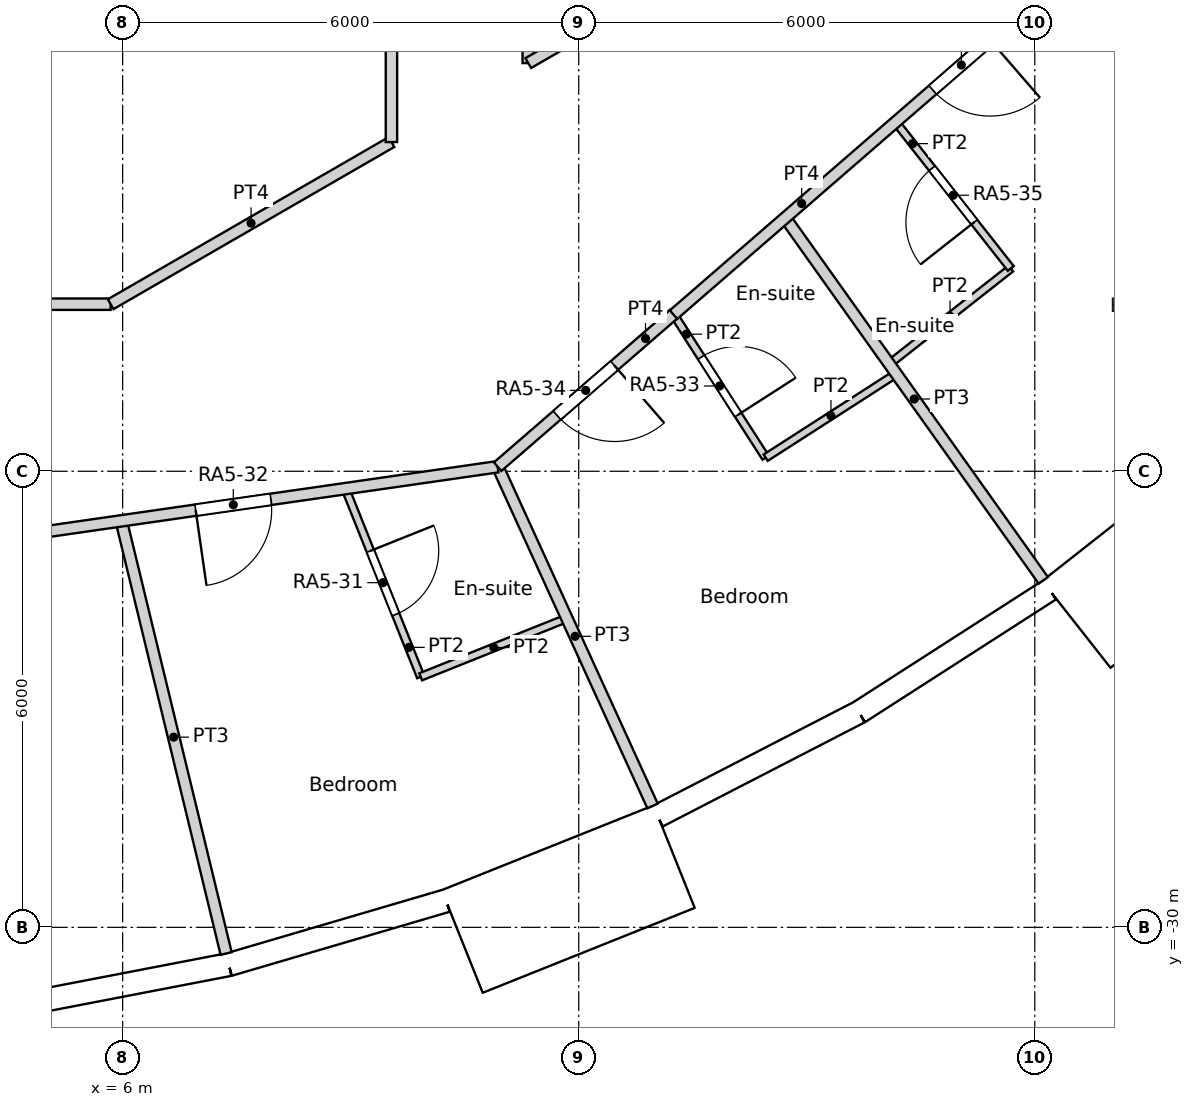
"""IFC4 building model, lengths in metres.
Left out: names, types, materials, properties, quantities, classifications, styles, units other than length and angle.
Written with IfcOpenShell. Run it as: python <this file> out.ifc"""

import sys

from ifc_helpers import new_model, si_unit, direction, frame, frame_2d, origin, origin_2d, place, context, subcontext, project, spatial, rectangle, circle, extrude, element, fill, save


model = new_model("IFC4")
c1 = context("Model", 3, precision=1e-05, world=origin(), true_north=direction((0.0, 1.0)))
c2 = subcontext(c1, "Body", "Model", "MODEL_VIEW")
j1 = project(units=[si_unit("LENGTHUNIT", "METRE"), si_unit("PLANEANGLEUNIT", "RADIAN")], contexts=[c1])
p1 = place(None, origin())
s1 = spatial("IfcSite", under=j1, at=p1, CompositionType="ELEMENT")
p2 = place(p1, origin())
s2 = spatial("IfcBuilding", under=s1, at=p2, CompositionType="ELEMENT")
p3 = place(p2, frame((0.0, 0.0, 71.4)))
s3 = spatial("IfcBuildingStorey", under=s2, at=p3, CompositionType="ELEMENT", Elevation=71.4)
for number, where, z_axis, x_axis in (
    (1, (7.137, -29.421, 0.0), (0.0, 0.0, 1.0), (1.0, 0.0, 0.0)),
    (2, (12.576, -27.539, 0.0), (0.0, 0.0, 1.0), (1.0, 0.0, 0.0)),
    (3, (17.561, -24.661, 0.0), (0.0, 0.0, 1.0), (1.0, 0.0, 0.0)),
):
    element("IfcColumn", number, at=place(p3, frame(where, z_axis=z_axis, x_axis=x_axis)), inside=s3, PredefinedType="COLUMN", context=c2, shape_type="SweptSolid", body=[
        extrude(circle(Radius=0.6, at=origin_2d()), origin(), (0.0, 0.0, 1.0), 3.6),
    ])
for number, where, z_axis, x_axis in (
    (4, (9.723, -22.54, 0.0), (0.0, 0.0, 1.0), (1.0, 0.0, 0.0)),
    (5, (14.659, -19.69, 0.0), (0.0, 0.0, 1.0), (1.0, 0.0, 0.0)),
):
    element("IfcColumn", number, at=place(p3, frame(where, z_axis=z_axis, x_axis=x_axis)), inside=s3, PredefinedType="COLUMN", context=c2, shape_type="SweptSolid", body=[
        extrude(circle(Radius=0.65, at=origin_2d()), origin(), (0.0, 0.0, 1.0), 3.6),
    ])
p4 = place(p3, frame((4.471, -31.054, 0.0), z_axis=(0.0, 0.0, 1.0), x_axis=(0.981924535406, 0.189272836848, 0.0)))
e6 = element("IfcWall", 6, at=p4, inside=s3, PredefinedType="SOLIDWALL", context=c2, shape_type="SweptSolid", body=[
    extrude(rectangle(XDim=2.98, YDim=0.3, at=frame_2d((1.49, 0.0))), origin(), (0.0, 0.0, 1.0), 3.15),
])
p5 = place(p4, frame((1.49, 0.0, 1.55)))
e7 = element("IfcOpeningElement", 7, at=p5, cuts=e6, PredefinedType="OPENING", context=c2, shape_type="SweptSolid", body=[
    extrude(circle(Radius=0.9, at=origin_2d()), frame((0.0, 0.16, 0.0), z_axis=(0.0, -1.0, 0.0), x_axis=(1.0, 0.0, 0.0)), (0.0, 0.0, 1.0), 0.32),
])
p6 = place(p3, frame((7.397, -30.49, 0.0), z_axis=(0.0, 0.0, 1.0), x_axis=(0.959507586834, 0.28168278401, 0.0)))
e8 = element("IfcWall", 8, at=p6, inside=s3, PredefinedType="SOLIDWALL", context=c2, shape_type="SweptSolid", body=[
    extrude(rectangle(XDim=2.98, YDim=0.3, at=frame_2d((1.49, 0.0))), origin(), (0.0, 0.0, 1.0), 3.15),
])
p7 = place(p6, frame((1.49, 0.0, 1.55)))
e9 = element("IfcOpeningElement", 9, at=p7, cuts=e8, PredefinedType="OPENING", context=c2, shape_type="SweptSolid", body=[
    extrude(circle(Radius=0.9, at=origin_2d()), frame((0.0, 0.16, 0.0), z_axis=(0.0, -1.0, 0.0), x_axis=(1.0, 0.0, 0.0)), (0.0, 0.0, 1.0), 0.32),
])
p8 = place(p3, frame((10.469, -30.185, -0.45), z_axis=(0.0, 0.0, 1.0), x_axis=(0.928358776184, 0.371685327504, 0.0)))
e10 = element("IfcWall", 10, at=p8, inside=s3, PredefinedType="ELEMENTEDWALL", context=c2, shape_type="SweptSolid", body=[
    extrude(rectangle(XDim=3.0, YDim=1.45, at=frame_2d((1.5, 0.0))), origin(), (0.0, 0.0, 1.0), 3.6),
])
p9 = place(p8, frame((1.5, 0.0, 2.0)))
e11 = element("IfcOpeningElement", 11, at=p9, cuts=e10, PredefinedType="OPENING", context=c2, shape_type="SweptSolid", body=[
    extrude(circle(Radius=0.9, at=origin_2d()), frame((0.0, 0.735, 0.0), z_axis=(0.0, -1.0, 0.0), x_axis=(1.0, 0.0, 0.0)), (0.0, 0.0, 1.0), 1.47),
])
p10 = place(p3, frame((13.039, -28.536, 0.0), z_axis=(0.0, 0.0, 1.0), x_axis=(0.888853225096, 0.4581920386, 0.0)))
e12 = element("IfcWall", 12, at=p10, inside=s3, PredefinedType="SOLIDWALL", context=c2, shape_type="SweptSolid", body=[
    extrude(rectangle(XDim=2.979, YDim=0.3, at=frame_2d((1.49, 0.0))), origin(), (0.0, 0.0, 1.0), 3.15),
])
p11 = place(p10, frame((1.49, 0.0, 1.55)))
e13 = element("IfcOpeningElement", 13, at=p11, cuts=e12, PredefinedType="OPENING", context=c2, shape_type="SweptSolid", body=[
    extrude(circle(Radius=0.9, at=origin_2d()), frame((0.0, 0.16, 0.0), z_axis=(0.0, -1.0, 0.0), x_axis=(1.0, 0.0, 0.0)), (0.0, 0.0, 1.0), 0.32),
])
p12 = place(p3, frame((15.687, -27.171, 0.0), z_axis=(0.0, 0.0, 1.0), x_axis=(0.84122372879, 0.540687190639, 0.0)))
e14 = element("IfcWall", 14, at=p12, inside=s3, PredefinedType="SOLIDWALL", context=c2, shape_type="SweptSolid", body=[
    extrude(rectangle(XDim=2.98, YDim=0.3, at=frame_2d((1.49, 0.0))), origin(), (0.0, 0.0, 1.0), 3.15),
])
p13 = place(p12, frame((1.49, 0.0, 1.55)))
e15 = element("IfcOpeningElement", 15, at=p13, cuts=e14, PredefinedType="OPENING", context=c2, shape_type="SweptSolid", body=[
    extrude(circle(Radius=0.9, at=origin_2d()), frame((0.0, 0.16, 0.0), z_axis=(0.0, -1.0, 0.0), x_axis=(1.0, 0.0, 0.0)), (0.0, 0.0, 1.0), 0.32),
])
p14 = place(p3, frame((18.549, -26.013, -0.45), z_axis=(0.0, 0.0, 1.0), x_axis=(0.786049992888, 0.618162930529, 0.0)))
e16 = element("IfcWall", 16, at=p14, inside=s3, PredefinedType="ELEMENTEDWALL", context=c2, shape_type="SweptSolid", body=[
    extrude(rectangle(XDim=3.0, YDim=1.45, at=frame_2d((1.5, 0.0))), origin(), (0.0, 0.0, 1.0), 3.6),
])
p15 = place(p14, frame((1.5, 0.0, 2.0)))
e17 = element("IfcOpeningElement", 17, at=p15, cuts=e16, PredefinedType="OPENING", context=c2, shape_type="SweptSolid", body=[
    extrude(circle(Radius=0.9, at=origin_2d()), frame((0.0, 0.735, 0.0), z_axis=(0.0, -1.0, 0.0), x_axis=(1.0, 0.0, 0.0)), (0.0, 0.0, 1.0), 1.47),
])
p16 = place(p3, frame((13.247, -21.939, 0.0), z_axis=(0.0, 0.0, 1.0), x_axis=(0.755420750547, 0.655240024451, 0.0)))
e18 = element("IfcWall", 18, at=p16, inside=s3, PredefinedType="PARTITIONING", context=c2, shape_type="SweptSolid", body=[
    extrude(rectangle(XDim=11.771, YDim=0.15, at=frame_2d((5.885, 0.0))), origin(), (0.0, 0.0, 1.0), 3.15),
])
p17 = place(p16, frame((4.513, 0.0, 0.0)))
e19 = element("IfcOpeningElement", 19, at=p17, cuts=e18, PredefinedType="OPENING", context=c2, shape_type="SweptSolid", body=[
    extrude(rectangle(XDim=1.0, YDim=2.1, at=frame_2d((0.5, 1.05))), frame((0.0, 0.075, 0.0), z_axis=(0.0, -1.0, 0.0), x_axis=(1.0, 0.0, 0.0)), (0.0, 0.0, 1.0), 0.15),
])
p18 = place(p16, frame((9.738, 0.0, 0.0)))
e20 = element("IfcOpeningElement", 20, at=p18, cuts=e18, PredefinedType="OPENING", context=c2, shape_type="SweptSolid", body=[
    extrude(rectangle(XDim=1.0, YDim=2.1, at=frame_2d((0.5, 1.05))), frame((0.0, 0.075, 0.0), z_axis=(0.0, -1.0, 0.0), x_axis=(1.0, 0.0, 0.0)), (0.0, 0.0, 1.0), 0.15),
])
p19 = place(p3, frame((0.608, -21.802, 0.0), z_axis=(0.0, 0.0, 1.0), x_axis=(1.0, 0.0, 0.0)))
e21 = element("IfcWall", 21, at=p19, inside=s3, PredefinedType="PARTITIONING", context=c2, shape_type="SweptSolid", body=[
    extrude(rectangle(XDim=5.234, YDim=0.15, at=frame_2d((2.617, 0.0))), origin(), (0.0, 0.0, 1.0), 3.15),
])
p20 = place(p3, frame((5.842, -21.802, 0.0), z_axis=(0.0, 0.0, 1.0), x_axis=(0.865983505205, 0.500072563448, 0.0)))
e22 = element("IfcWall", 22, at=p20, inside=s3, PredefinedType="PARTITIONING", context=c2, shape_type="SweptSolid", body=[
    extrude(rectangle(XDim=4.265, YDim=0.15, at=frame_2d((2.133, 0.0))), origin(), (0.0, 0.0, 1.0), 3.15),
])
p21 = place(p3, frame((9.536, -19.669, 0.0), z_axis=(0.0, 0.0, 1.0), x_axis=(0.0, 1.0, 0.0)))
e23 = element("IfcWall", 23, at=p21, inside=s3, PredefinedType="PARTITIONING", context=c2, shape_type="SweptSolid", body=[
    extrude(rectangle(XDim=7.869, YDim=0.15, at=frame_2d((3.935, 0.0))), origin(), (0.0, 0.0, 1.0), 3.15),
])
p22 = place(p3, frame((11.336, -18.63, 0.0), z_axis=(0.0, 0.0, 1.0), x_axis=(0.0, 1.0, 0.0)))
e24 = element("IfcWall", 24, at=p22, inside=s3, PredefinedType="PARTITIONING", context=c2, shape_type="SweptSolid", body=[
    extrude(rectangle(XDim=6.83, YDim=0.15, at=frame_2d((3.415, 0.0))), origin(), (0.0, 0.0, 1.0), 3.15),
])
p23 = place(p22, frame((1.64, 0.0, 0.0)))
e25 = element("IfcOpeningElement", 25, at=p23, cuts=e24, PredefinedType="OPENING", context=c2, shape_type="SweptSolid", body=[
    extrude(rectangle(XDim=0.95, YDim=2.1, at=frame_2d((0.475, 1.05))), frame((0.0, 0.075, 0.0), z_axis=(0.0, -1.0, 0.0), x_axis=(1.0, 0.0, 0.0)), (0.0, 0.0, 1.0), 0.15),
])
p24 = place(p3, frame((11.336, -18.63, 0.0), z_axis=(0.0, 0.0, 1.0), x_axis=(0.866063337164, 0.499934291702, 0.0)))
e26 = element("IfcWall", 26, at=p24, inside=s3, PredefinedType="PARTITIONING", context=c2, shape_type="SweptSolid", body=[
    extrude(rectangle(XDim=5.155, YDim=0.15, at=frame_2d((2.577, 0.0))), origin(), (0.0, 0.0, 1.0), 3.15),
])
p25 = place(p3, frame((-3.746, -26.051, 0.0), z_axis=(0.0, 0.0, 1.0), x_axis=(0.989823328782, 0.142301713967, 0.0)))
e27 = element("IfcWall", 27, at=p25, inside=s3, PredefinedType="PARTITIONING", context=c2, shape_type="SweptSolid", body=[
    extrude(rectangle(XDim=14.83, YDim=0.15, at=frame_2d((7.415, 0.0))), origin(), (0.0, 0.0, 1.0), 3.15),
])
p26 = place(p25, frame((4.415, 0.0, 0.0)))
e28 = element("IfcOpeningElement", 28, at=p26, cuts=e27, PredefinedType="OPENING", context=c2, shape_type="SweptSolid", body=[
    extrude(rectangle(XDim=1.0, YDim=2.04, at=frame_2d((0.5, 1.02))), frame((0.0, 0.075, 0.0), z_axis=(0.0, -1.0, 0.0), x_axis=(1.0, 0.0, 0.0)), (0.0, 0.0, 1.0), 0.15),
])
p27 = place(p25, frame((10.816, 0.0, 0.0)))
e29 = element("IfcOpeningElement", 29, at=p27, cuts=e27, PredefinedType="OPENING", context=c2, shape_type="SweptSolid", body=[
    extrude(rectangle(XDim=1.0, YDim=2.1, at=frame_2d((0.5, 1.05))), frame((0.0, 0.075, 0.0), z_axis=(0.0, -1.0, 0.0), x_axis=(1.0, 0.0, 0.0)), (0.0, 0.0, 1.0), 0.15),
])
p28 = place(p3, frame((10.933, -23.94, 0.0), z_axis=(0.0, 0.0, 1.0), x_axis=(0.755675945931, 0.654945696025, 0.0)))
e30 = element("IfcWall", 30, at=p28, inside=s3, PredefinedType="PARTITIONING", context=c2, shape_type="SweptSolid", body=[
    extrude(rectangle(XDim=3.066, YDim=0.15, at=frame_2d((1.533, 0.0))), origin(), (0.0, 0.0, 1.0), 3.15),
])
p29 = place(p28, frame((1.033, 0.0, 0.0)))
e31 = element("IfcOpeningElement", 31, at=p29, cuts=e30, PredefinedType="OPENING", context=c2, shape_type="SweptSolid", body=[
    extrude(rectangle(XDim=1.0, YDim=2.1, at=frame_2d((0.5, 1.05))), frame((0.0, 0.075, 0.0), z_axis=(0.0, -1.0, 0.0), x_axis=(1.0, 0.0, 0.0)), (0.0, 0.0, 1.0), 0.15),
])
p30 = place(p3, frame((5.981, -24.652, 0.0), z_axis=(0.0, 0.0, 1.0), x_axis=(0.235644168604, -0.971839403298, 0.0)))
e32 = element("IfcWall", 32, at=p30, inside=s3, PredefinedType="PARTITIONING", context=c2, shape_type="SweptSolid", body=[
    extrude(rectangle(XDim=5.857, YDim=0.15, at=frame_2d((2.928, 0.0))), origin(), (0.0, 0.0, 1.0), 3.15),
])
p31 = place(p3, frame((8.93, -24.228, 0.0), z_axis=(0.0, 0.0, 1.0), x_axis=(0.371564281805, -0.928407229876, 0.0)))
e33 = element("IfcWall", 33, at=p31, inside=s3, PredefinedType="PARTITIONING", context=c2, shape_type="SweptSolid", body=[
    extrude(rectangle(XDim=2.667, YDim=0.1, at=frame_2d((1.333, 0.0))), origin(), (0.0, 0.0, 1.0), 3.15),
])
p32 = place(p31, frame((0.883, 0.0, 0.0)))
e34 = element("IfcOpeningElement", 34, at=p32, cuts=e33, PredefinedType="OPENING", context=c2, shape_type="SweptSolid", body=[
    extrude(rectangle(XDim=0.9, YDim=2.04, at=frame_2d((0.45, 1.02))), frame((0.0, 0.05, 0.0), z_axis=(0.0, -1.0, 0.0), x_axis=(1.0, 0.0, 0.0)), (0.0, 0.0, 1.0), 0.1),
])
p33 = place(p3, frame((9.921, -26.704, 0.0), z_axis=(0.0, 0.0, 1.0), x_axis=(0.928346586681, 0.37171577179, 0.0)))
e35 = element("IfcWall", 35, at=p33, inside=s3, PredefinedType="PARTITIONING", context=c2, shape_type="SweptSolid", body=[
    extrude(rectangle(XDim=2.072, YDim=0.1, at=frame_2d((1.036, 0.0))), origin(), (0.0, 0.0, 1.0), 3.15),
])
p34 = place(p3, frame((10.934, -23.94, 0.0), z_axis=(0.0, 0.0, 1.0), x_axis=(0.415245800153, -0.909709253254, 0.0)))
e36 = element("IfcWall", 36, at=p34, inside=s3, PredefinedType="PARTITIONING", context=c2, shape_type="SweptSolid", body=[
    extrude(rectangle(XDim=4.906, YDim=0.15, at=frame_2d((2.453, 0.0))), origin(), (0.0, 0.0, 1.0), 3.15),
])
p35 = place(p3, frame((13.248, -21.935, 0.0), z_axis=(0.0, 0.0, 1.0), x_axis=(0.540597960994, -0.841281073464, 0.0)))
e37 = element("IfcWall", 37, at=p35, inside=s3, PredefinedType="PARTITIONING", context=c2, shape_type="SweptSolid", body=[
    extrude(rectangle(XDim=2.242, YDim=0.1, at=frame_2d((1.121, 0.0))), origin(), (0.0, 0.0, 1.0), 3.15),
])
p36 = place(p35, frame((0.671, 0.0, 0.0)))
e38 = element("IfcOpeningElement", 38, at=p36, cuts=e37, PredefinedType="OPENING", context=c2, shape_type="SweptSolid", body=[
    extrude(rectangle(XDim=0.9, YDim=2.04, at=frame_2d((0.45, 1.02))), frame((0.0, 0.05, 0.0), z_axis=(0.0, -1.0, 0.0), x_axis=(1.0, 0.0, 0.0)), (0.0, 0.0, 1.0), 0.1),
])
p37 = place(p3, frame((14.46, -23.821, 0.0), z_axis=(0.0, 0.0, 1.0), x_axis=(0.841135728185, 0.540824081168, 0.0)))
e39 = element("IfcWall", 39, at=p37, inside=s3, PredefinedType="PARTITIONING", context=c2, shape_type="SweptSolid", body=[
    extrude(rectangle(XDim=2.041, YDim=0.1, at=frame_2d((1.021, 0.0))), origin(), (0.0, 0.0, 1.0), 3.15),
])
p38 = place(p3, frame((14.715, -20.664, 0.0), z_axis=(0.0, 0.0, 1.0), x_axis=(0.57995989616, -0.814645026282, 0.0)))
e40 = element("IfcWall", 40, at=p38, inside=s3, PredefinedType="PARTITIONING", context=c2, shape_type="SweptSolid", body=[
    extrude(rectangle(XDim=5.857, YDim=0.15, at=frame_2d((2.928, 0.0))), origin(), (0.0, 0.0, 1.0), 3.15),
])
p39 = place(p3, frame((16.086, -22.589, 0.0), z_axis=(0.0, 0.0, 1.0), x_axis=(0.785984904201, 0.618245687707, 0.0)))
e41 = element("IfcWall", 41, at=p39, inside=s3, PredefinedType="PARTITIONING", context=c2, shape_type="SweptSolid", body=[
    extrude(rectangle(XDim=2.033, YDim=0.1, at=frame_2d((1.017, 0.0))), origin(), (0.0, 0.0, 1.0), 3.15),
])
p40 = place(p3, frame((16.168, -19.404, 0.0), z_axis=(0.0, 0.0, 1.0), x_axis=(0.618142414415, -0.786066126672, 0.0)))
e42 = element("IfcWall", 42, at=p40, inside=s3, PredefinedType="PARTITIONING", context=c2, shape_type="SweptSolid", body=[
    extrude(rectangle(XDim=2.453, YDim=0.1, at=frame_2d((1.226, 0.0))), origin(), (0.0, 0.0, 1.0), 3.15),
])
p41 = place(p40, frame((0.777, 0.0, 0.0)))
e43 = element("IfcOpeningElement", 43, at=p41, cuts=e42, PredefinedType="OPENING", context=c2, shape_type="SweptSolid", body=[
    extrude(rectangle(XDim=0.9, YDim=2.04, at=frame_2d((0.45, 1.02))), frame((0.0, 0.05, 0.0), z_axis=(0.0, -1.0, 0.0), x_axis=(1.0, 0.0, 0.0)), (0.0, 0.0, 1.0), 0.1),
])
p42 = place(p3, frame((18.359, -17.506, 0.0), z_axis=(0.0, 0.0, 1.0), x_axis=(0.723808715798, -0.690000683286, 0.0)))
e44 = element("IfcWall", 44, at=p42, inside=s3, PredefinedType="PARTITIONING", context=c2, shape_type="SweptSolid", body=[
    extrude(rectangle(XDim=5.856, YDim=0.15, at=frame_2d((2.928, 0.0))), origin(), (0.0, 0.0, 1.0), 3.15),
])
p43 = place(p5, origin())
e45 = element("IfcWindow", 45, at=p43, inside=s3, PartitioningType="SINGLE_PANEL", PredefinedType="WINDOW", context=c2, shape_type="SweptSolid", body=[
    extrude(circle(Radius=0.9, at=origin_2d()), frame((0.0, 0.12, 0.0), z_axis=(0.0, -1.0, 0.0), x_axis=(1.0, 0.0, 0.0)), (0.0, 0.0, 1.0), 0.1),
])
fill(e7, e45)
p44 = place(p7, origin())
e46 = element("IfcWindow", 46, at=p44, inside=s3, PartitioningType="SINGLE_PANEL", PredefinedType="WINDOW", context=c2, shape_type="SweptSolid", body=[
    extrude(circle(Radius=0.9, at=origin_2d()), frame((0.0, 0.12, 0.0), z_axis=(0.0, -1.0, 0.0), x_axis=(1.0, 0.0, 0.0)), (0.0, 0.0, 1.0), 0.1),
])
fill(e9, e46)
p45 = place(p9, origin())
e47 = element("IfcWindow", 47, at=p45, inside=s3, PartitioningType="SINGLE_PANEL", PredefinedType="WINDOW", context=c2, shape_type="SweptSolid", body=[
    extrude(circle(Radius=0.9, at=origin_2d()), frame((0.0, 0.695, 0.0), z_axis=(0.0, -1.0, 0.0), x_axis=(1.0, 0.0, 0.0)), (0.0, 0.0, 1.0), 0.1),
])
fill(e11, e47)
p46 = place(p11, origin())
e48 = element("IfcWindow", 48, at=p46, inside=s3, PartitioningType="SINGLE_PANEL", PredefinedType="WINDOW", context=c2, shape_type="SweptSolid", body=[
    extrude(circle(Radius=0.9, at=origin_2d()), frame((0.0, 0.12, 0.0), z_axis=(0.0, -1.0, 0.0), x_axis=(1.0, 0.0, 0.0)), (0.0, 0.0, 1.0), 0.1),
])
fill(e13, e48)
p47 = place(p13, origin())
e49 = element("IfcWindow", 49, at=p47, inside=s3, PartitioningType="SINGLE_PANEL", PredefinedType="WINDOW", context=c2, shape_type="SweptSolid", body=[
    extrude(circle(Radius=0.9, at=origin_2d()), frame((0.0, 0.12, 0.0), z_axis=(0.0, -1.0, 0.0), x_axis=(1.0, 0.0, 0.0)), (0.0, 0.0, 1.0), 0.1),
])
fill(e15, e49)
p48 = place(p15, origin())
e50 = element("IfcWindow", 50, at=p48, inside=s3, PartitioningType="SINGLE_PANEL", PredefinedType="WINDOW", context=c2, shape_type="SweptSolid", body=[
    extrude(circle(Radius=0.9, at=origin_2d()), frame((0.0, 0.695, 0.0), z_axis=(0.0, -1.0, 0.0), x_axis=(1.0, 0.0, 0.0)), (0.0, 0.0, 1.0), 0.1),
])
fill(e17, e50)
p49 = place(p32, origin())
e51 = element("IfcDoor", 51, at=p49, inside=s3, OperationType="SINGLE_SWING_LEFT", PredefinedType="DOOR", context=c2, shape_type="SweptSolid", body=[
    extrude(rectangle(XDim=0.9, YDim=2.04, at=frame_2d((0.45, 1.02))), frame((0.0, 0.025, 0.0), z_axis=(0.0, -1.0, 0.0), x_axis=(1.0, 0.0, 0.0)), (0.0, 0.0, 1.0), 0.05),
])
fill(e34, e51)
p50 = place(p27, origin())
e52 = element("IfcDoor", 52, at=p50, inside=s3, OperationType="SINGLE_SWING_RIGHT", PredefinedType="DOOR", context=c2, shape_type="SweptSolid", body=[
    extrude(rectangle(XDim=1.0, YDim=2.1, at=frame_2d((0.5, 1.05))), frame((0.0, 0.025, 0.0), z_axis=(0.0, -1.0, 0.0), x_axis=(1.0, 0.0, 0.0)), (0.0, 0.0, 1.0), 0.05),
])
fill(e29, e52)
p51 = place(p36, origin())
e53 = element("IfcDoor", 53, at=p51, inside=s3, OperationType="SINGLE_SWING_RIGHT", PredefinedType="DOOR", context=c2, shape_type="SweptSolid", body=[
    extrude(rectangle(XDim=0.9, YDim=2.04, at=frame_2d((0.45, 1.02))), frame((0.0, 0.025, 0.0), z_axis=(0.0, -1.0, 0.0), x_axis=(1.0, 0.0, 0.0)), (0.0, 0.0, 1.0), 0.05),
])
fill(e38, e53)
p52 = place(p29, origin())
e54 = element("IfcDoor", 54, at=p52, inside=s3, OperationType="SINGLE_SWING_LEFT", PredefinedType="DOOR", context=c2, shape_type="SweptSolid", body=[
    extrude(rectangle(XDim=1.0, YDim=2.1, at=frame_2d((0.5, 1.05))), frame((0.0, 0.025, 0.0), z_axis=(0.0, -1.0, 0.0), x_axis=(1.0, 0.0, 0.0)), (0.0, 0.0, 1.0), 0.05),
])
fill(e31, e54)
p53 = place(p41, origin())
e55 = element("IfcDoor", 55, at=p53, inside=s3, OperationType="SINGLE_SWING_LEFT", PredefinedType="DOOR", context=c2, shape_type="SweptSolid", body=[
    extrude(rectangle(XDim=0.9, YDim=2.04, at=frame_2d((0.45, 1.02))), frame((0.0, 0.025, 0.0), z_axis=(0.0, -1.0, 0.0), x_axis=(1.0, 0.0, 0.0)), (0.0, 0.0, 1.0), 0.05),
])
fill(e43, e55)
p54 = place(p17, origin())
e56 = element("IfcDoor", 56, at=p54, inside=s3, OperationType="SINGLE_SWING_LEFT", PredefinedType="DOOR", context=c2, shape_type="SweptSolid", body=[
    extrude(rectangle(XDim=1.0, YDim=2.1, at=frame_2d((0.5, 1.05))), frame((0.0, 0.025, 0.0), z_axis=(0.0, -1.0, 0.0), x_axis=(1.0, 0.0, 0.0)), (0.0, 0.0, 1.0), 0.05),
])
fill(e19, e56)
save(model, sys.argv[1])
